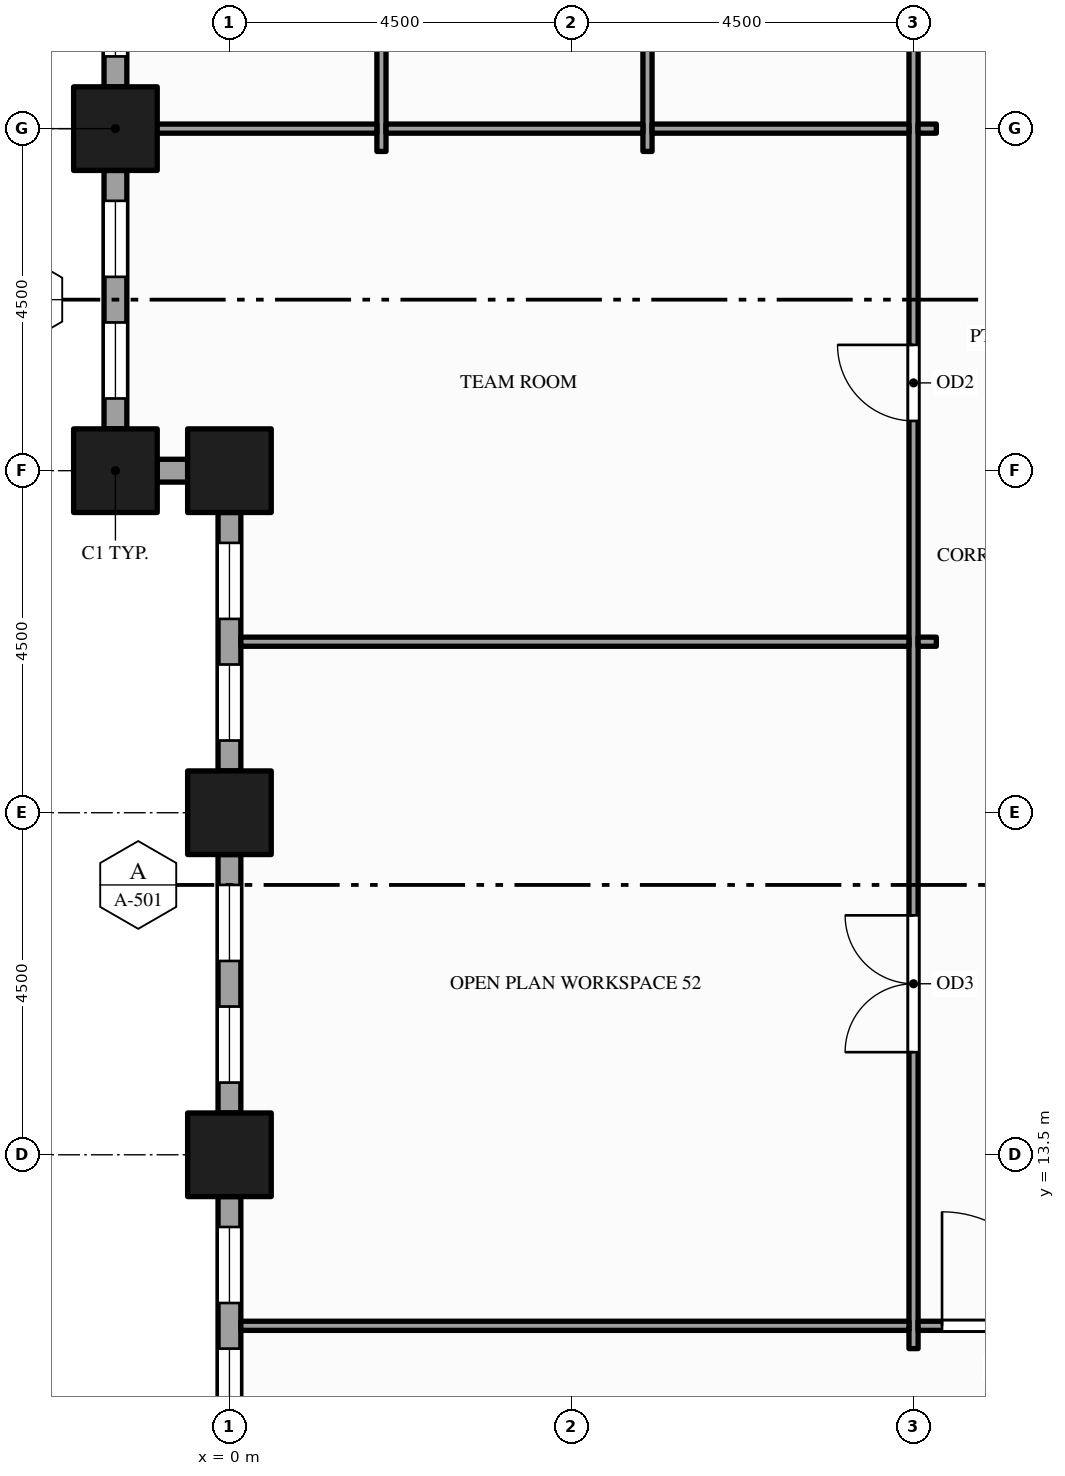
"""IFC4 building model, lengths in metres.
Left out: names, types, materials, properties, quantities, classifications, styles, units other than length and angle.
Written with IfcOpenShell. Run it as: python <this file> out.ifc"""

import sys

from ifc_helpers import new_model, si_unit, direction, frame, frame_2d, origin, origin_2d, place, context, subcontext, project, spatial, rectangle, hollow_rectangle, extrude, element, fill, save


model = new_model("IFC4")
c1 = context("Model", 3, precision=1e-05, world=origin(), true_north=direction((0.0, 1.0)))
c2 = subcontext(c1, "Body", "Model", "MODEL_VIEW")
j1 = project(units=[si_unit("LENGTHUNIT", "METRE"), si_unit("PLANEANGLEUNIT", "RADIAN")], contexts=[c1])
p1 = place(None, origin())
s1 = spatial("IfcSite", under=j1, at=p1, CompositionType="ELEMENT")
p2 = place(p1, origin())
s2 = spatial("IfcBuilding", under=s1, at=p2, CompositionType="ELEMENT")
p3 = place(p2, frame((0.0, 0.0, 73.0)))
s3 = spatial("IfcBuildingStorey", under=s2, at=p3, CompositionType="ELEMENT", Elevation=73.0)
for number, where, z_axis, x_axis in (
    (1, (-1.5, 22.5, -0.15), (0.0, 0.0, 1.0), (1.0, 0.0, 0.0)),
    (2, (-1.5, 27.0, -0.15), (0.0, 0.0, 1.0), (1.0, 0.0, 0.0)),
    (3, (0.0, 13.5, -0.15), (0.0, 0.0, 1.0), (1.0, 0.0, 0.0)),
    (4, (0.0, 18.0, -0.15), (0.0, 0.0, 1.0), (1.0, 0.0, 0.0)),
    (5, (0.0, 22.5, -0.15), (0.0, 0.0, 1.0), (1.0, 0.0, 0.0)),
):
    element("IfcColumn", number, at=place(p3, frame(where, z_axis=z_axis, x_axis=x_axis)), inside=s3, PredefinedType="COLUMN", context=c2, shape_type="SweptSolid", body=[
        extrude(hollow_rectangle(XDim=1.1, YDim=1.1, WallThickness=0.06, at=origin_2d()), origin(), (0.0, 0.0, 1.0), 3.9),
    ])
p4 = place(p3, frame((-1.5, 30.95, 0.0), z_axis=(0.0, 0.0, 1.0), x_axis=(0.0, -1.0, 0.0)))
e6 = element("IfcWall", 6, at=p4, inside=s3, PredefinedType="STANDARD", context=c2, shape_type="SweptSolid", body=[
    extrude(rectangle(XDim=3.4, YDim=0.3, at=frame_2d((1.7, 0.0))), origin(), (0.0, 0.0, 1.0), 3.044),
])
p5 = place(p4, frame((0.4, 0.0, 0.9)))
e7 = element("IfcOpeningElement", 7, at=p5, cuts=e6, PredefinedType="OPENING", context=c2, shape_type="SweptSolid", body=[
    extrude(rectangle(XDim=1.0, YDim=2.0, at=frame_2d((0.5, 1.0))), frame((0.0, 0.16, 0.0), z_axis=(0.0, -1.0, 0.0), x_axis=(1.0, 0.0, 0.0)), (0.0, 0.0, 1.0), 0.32),
])
p6 = place(p4, frame((2.0, 0.0, 0.9)))
e8 = element("IfcOpeningElement", 8, at=p6, cuts=e6, PredefinedType="OPENING", context=c2, shape_type="SweptSolid", body=[
    extrude(rectangle(XDim=1.0, YDim=2.0, at=frame_2d((0.5, 1.0))), frame((0.0, 0.16, 0.0), z_axis=(0.0, -1.0, 0.0), x_axis=(1.0, 0.0, 0.0)), (0.0, 0.0, 1.0), 0.32),
])
p7 = place(p3, frame((-1.5, 26.45, 0.0), z_axis=(0.0, 0.0, 1.0), x_axis=(0.0, -1.0, 0.0)))
e9 = element("IfcWall", 9, at=p7, inside=s3, PredefinedType="STANDARD", context=c2, shape_type="SweptSolid", body=[
    extrude(rectangle(XDim=3.4, YDim=0.3, at=frame_2d((1.7, 0.0))), origin(), (0.0, 0.0, 1.0), 3.044),
])
p8 = place(p7, frame((0.4, 0.0, 0.9)))
e10 = element("IfcOpeningElement", 10, at=p8, cuts=e9, PredefinedType="OPENING", context=c2, shape_type="SweptSolid", body=[
    extrude(rectangle(XDim=1.0, YDim=2.0, at=frame_2d((0.5, 1.0))), frame((0.0, 0.16, 0.0), z_axis=(0.0, -1.0, 0.0), x_axis=(1.0, 0.0, 0.0)), (0.0, 0.0, 1.0), 0.32),
])
p9 = place(p7, frame((2.0, 0.0, 0.9)))
e11 = element("IfcOpeningElement", 11, at=p9, cuts=e9, PredefinedType="OPENING", context=c2, shape_type="SweptSolid", body=[
    extrude(rectangle(XDim=1.0, YDim=2.0, at=frame_2d((0.5, 1.0))), frame((0.0, 0.16, 0.0), z_axis=(0.0, -1.0, 0.0), x_axis=(1.0, 0.0, 0.0)), (0.0, 0.0, 1.0), 0.32),
])
p10 = place(p3, frame((-0.95, 22.5, 0.0), z_axis=(0.0, 0.0, 1.0), x_axis=(1.0, 0.0, 0.0)))
e12 = element("IfcWall", 12, at=p10, inside=s3, PredefinedType="STANDARD", context=c2, shape_type="SweptSolid", body=[
    extrude(rectangle(XDim=0.4, YDim=0.3, at=frame_2d((0.2, 0.0))), origin(), (0.0, 0.0, 1.0), 3.044),
])
p11 = place(p3, frame((0.0, 21.95, 0.0), z_axis=(0.0, 0.0, 1.0), x_axis=(0.0, -1.0, 0.0)))
e13 = element("IfcWall", 13, at=p11, inside=s3, PredefinedType="STANDARD", context=c2, shape_type="SweptSolid", body=[
    extrude(rectangle(XDim=3.4, YDim=0.3, at=frame_2d((1.7, 0.0))), origin(), (0.0, 0.0, 1.0), 3.044),
])
p12 = place(p11, frame((0.4, 0.0, 0.9)))
e14 = element("IfcOpeningElement", 14, at=p12, cuts=e13, PredefinedType="OPENING", context=c2, shape_type="SweptSolid", body=[
    extrude(rectangle(XDim=1.0, YDim=2.0, at=frame_2d((0.5, 1.0))), frame((0.0, 0.16, 0.0), z_axis=(0.0, -1.0, 0.0), x_axis=(1.0, 0.0, 0.0)), (0.0, 0.0, 1.0), 0.32),
])
p13 = place(p11, frame((2.0, 0.0, 0.9)))
e15 = element("IfcOpeningElement", 15, at=p13, cuts=e13, PredefinedType="OPENING", context=c2, shape_type="SweptSolid", body=[
    extrude(rectangle(XDim=1.0, YDim=2.0, at=frame_2d((0.5, 1.0))), frame((0.0, 0.16, 0.0), z_axis=(0.0, -1.0, 0.0), x_axis=(1.0, 0.0, 0.0)), (0.0, 0.0, 1.0), 0.32),
])
p14 = place(p3, frame((0.0, 17.45, 0.0), z_axis=(0.0, 0.0, 1.0), x_axis=(0.0, -1.0, 0.0)))
e16 = element("IfcWall", 16, at=p14, inside=s3, PredefinedType="STANDARD", context=c2, shape_type="SweptSolid", body=[
    extrude(rectangle(XDim=3.4, YDim=0.3, at=frame_2d((1.7, 0.0))), origin(), (0.0, 0.0, 1.0), 3.044),
])
p15 = place(p14, frame((0.4, 0.0, 0.9)))
e17 = element("IfcOpeningElement", 17, at=p15, cuts=e16, PredefinedType="OPENING", context=c2, shape_type="SweptSolid", body=[
    extrude(rectangle(XDim=1.0, YDim=2.0, at=frame_2d((0.5, 1.0))), frame((0.0, 0.16, 0.0), z_axis=(0.0, -1.0, 0.0), x_axis=(1.0, 0.0, 0.0)), (0.0, 0.0, 1.0), 0.32),
])
p16 = place(p14, frame((2.0, 0.0, 0.9)))
e18 = element("IfcOpeningElement", 18, at=p16, cuts=e16, PredefinedType="OPENING", context=c2, shape_type="SweptSolid", body=[
    extrude(rectangle(XDim=1.0, YDim=2.0, at=frame_2d((0.5, 1.0))), frame((0.0, 0.16, 0.0), z_axis=(0.0, -1.0, 0.0), x_axis=(1.0, 0.0, 0.0)), (0.0, 0.0, 1.0), 0.32),
])
p17 = place(p3, frame((0.0, 12.95, 0.0), z_axis=(0.0, 0.0, 1.0), x_axis=(0.0, -1.0, 0.0)))
e19 = element("IfcWall", 19, at=p17, inside=s3, PredefinedType="STANDARD", context=c2, shape_type="SweptSolid", body=[
    extrude(rectangle(XDim=3.4, YDim=0.3, at=frame_2d((1.7, 0.0))), origin(), (0.0, 0.0, 1.0), 3.044),
])
p18 = place(p17, frame((0.4, 0.0, 0.9)))
e20 = element("IfcOpeningElement", 20, at=p18, cuts=e19, PredefinedType="OPENING", context=c2, shape_type="SweptSolid", body=[
    extrude(rectangle(XDim=1.0, YDim=2.0, at=frame_2d((0.5, 1.0))), frame((0.0, 0.16, 0.0), z_axis=(0.0, -1.0, 0.0), x_axis=(1.0, 0.0, 0.0)), (0.0, 0.0, 1.0), 0.32),
])
p19 = place(p17, frame((2.0, 0.0, 0.9)))
e21 = element("IfcOpeningElement", 21, at=p19, cuts=e19, PredefinedType="OPENING", context=c2, shape_type="SweptSolid", body=[
    extrude(rectangle(XDim=1.0, YDim=2.0, at=frame_2d((0.5, 1.0))), frame((0.0, 0.16, 0.0), z_axis=(0.0, -1.0, 0.0), x_axis=(1.0, 0.0, 0.0)), (0.0, 0.0, 1.0), 0.32),
])
for number, where, z_axis, x_axis in (
    (22, (2.0, 26.7, 0.0), (0.0, 0.0, 1.0), (0.0, 1.0, 0.0)),
    (23, (5.5, 26.7, 0.0), (0.0, 0.0, 1.0), (0.0, 1.0, 0.0)),
):
    element("IfcWall", number, at=place(p3, frame(where, z_axis=z_axis, x_axis=x_axis)), inside=s3, PredefinedType="PARTITIONING", context=c2, shape_type="SweptSolid", body=[
        extrude(rectangle(XDim=5.1, YDim=0.12, at=frame_2d((2.55, 0.0))), origin(), (0.0, 0.0, 1.0), 3.75),
    ])
p20 = place(p3, frame((9.0, 10.95, 0.0), z_axis=(0.0, 0.0, 1.0), x_axis=(0.0, 1.0, 0.0)))
e24 = element("IfcWall", 24, at=p20, inside=s3, PredefinedType="PARTITIONING", context=c2, shape_type="SweptSolid", body=[
    extrude(rectangle(XDim=20.85, YDim=0.12, at=frame_2d((10.425, 0.0))), origin(), (0.0, 0.0, 1.0), 2.5),
])
p21 = place(p20, frame((3.9, 0.0, 0.0)))
e25 = element("IfcOpeningElement", 25, at=p21, cuts=e24, PredefinedType="OPENING", context=c2, shape_type="SweptSolid", body=[
    extrude(rectangle(XDim=1.8, YDim=2.1, at=frame_2d((0.9, 1.05))), frame((0.0, 0.07, 0.0), z_axis=(0.0, -1.0, 0.0), x_axis=(1.0, 0.0, 0.0)), (0.0, 0.0, 1.0), 0.14),
])
p22 = place(p20, frame((12.205, 0.0, 0.0)))
e26 = element("IfcOpeningElement", 26, at=p22, cuts=e24, PredefinedType="OPENING", context=c2, shape_type="SweptSolid", body=[
    extrude(rectangle(XDim=1.0, YDim=2.1, at=frame_2d((0.5, 1.05))), frame((0.0, 0.07, 0.0), z_axis=(0.0, -1.0, 0.0), x_axis=(1.0, 0.0, 0.0)), (0.0, 0.0, 1.0), 0.14),
])
p23 = place(p3, frame((0.15, 11.25, 0.0), z_axis=(0.0, 0.0, 1.0), x_axis=(1.0, 0.0, 0.0)))
e27 = element("IfcWall", 27, at=p23, inside=s3, PredefinedType="PARTITIONING", context=c2, shape_type="SweptSolid", body=[
    extrude(rectangle(XDim=8.79, YDim=0.12, at=frame_2d((4.395, 0.0))), origin(), (0.0, 0.0, 1.0), 2.838),
])
p24 = place(p3, frame((9.06, 11.25, 0.0), z_axis=(0.0, 0.0, 1.0), x_axis=(1.0, 0.0, 0.0)))
e28 = element("IfcWall", 28, at=p24, inside=s3, PredefinedType="PARTITIONING", context=c2, shape_type="SweptSolid", body=[
    extrude(rectangle(XDim=2.13, YDim=0.12, at=frame_2d((1.065, 0.0))), origin(), (0.0, 0.0, 1.0), 2.838),
])
p25 = place(p24, frame((0.315, 0.0, 0.0)))
e29 = element("IfcOpeningElement", 29, at=p25, cuts=e28, PredefinedType="OPENING", context=c2, shape_type="SweptSolid", body=[
    extrude(rectangle(XDim=1.5, YDim=2.1, at=frame_2d((0.75, 1.05))), frame((0.0, 0.07, 0.0), z_axis=(0.0, -1.0, 0.0), x_axis=(1.0, 0.0, 0.0)), (0.0, 0.0, 1.0), 0.14),
])
p26 = place(p3, frame((0.15, 20.25, 0.0), z_axis=(0.0, 0.0, 1.0), x_axis=(1.0, 0.0, 0.0)))
e30 = element("IfcWall", 30, at=p26, inside=s3, PredefinedType="PARTITIONING", context=c2, shape_type="SweptSolid", body=[
    extrude(rectangle(XDim=8.79, YDim=0.12, at=frame_2d((4.395, 0.0))), origin(), (0.0, 0.0, 1.0), 2.838),
])
p27 = place(p3, frame((9.06, 20.25, 0.0), z_axis=(0.0, 0.0, 1.0), x_axis=(1.0, 0.0, 0.0)))
e31 = element("IfcWall", 31, at=p27, inside=s3, PredefinedType="PARTITIONING", context=c2, shape_type="SweptSolid", body=[
    extrude(rectangle(XDim=0.24, YDim=0.12, at=frame_2d((0.12, 0.0))), origin(), (0.0, 0.0, 1.0), 2.838),
])
p28 = place(p3, frame((-1.35, 27.0, 0.0), z_axis=(0.0, 0.0, 1.0), x_axis=(1.0, 0.0, 0.0)))
e32 = element("IfcWall", 32, at=p28, inside=s3, PredefinedType="PARTITIONING", context=c2, shape_type="SweptSolid", body=[
    extrude(rectangle(XDim=3.29, YDim=0.12, at=frame_2d((1.645, 0.0))), origin(), (0.0, 0.0, 1.0), 2.35),
])
for number, where, z_axis, x_axis in (
    (33, (2.06, 27.0, 0.0), (0.0, 0.0, 1.0), (1.0, 0.0, 0.0)),
    (34, (5.56, 27.0, 0.0), (0.0, 0.0, 1.0), (1.0, 0.0, 0.0)),
):
    element("IfcWall", number, at=place(p3, frame(where, z_axis=z_axis, x_axis=x_axis)), inside=s3, PredefinedType="PARTITIONING", context=c2, shape_type="SweptSolid", body=[
        extrude(rectangle(XDim=3.38, YDim=0.12, at=frame_2d((1.69, 0.0))), origin(), (0.0, 0.0, 1.0), 2.838),
    ])
p29 = place(p3, frame((9.06, 27.0, 0.0), z_axis=(0.0, 0.0, 1.0), x_axis=(1.0, 0.0, 0.0)))
e35 = element("IfcWall", 35, at=p29, inside=s3, PredefinedType="PARTITIONING", context=c2, shape_type="SweptSolid", body=[
    extrude(rectangle(XDim=0.24, YDim=0.12, at=frame_2d((0.12, 0.0))), origin(), (0.0, 0.0, 1.0), 2.838),
])
p30 = place(p6, origin())
e36 = element("IfcWindow", 36, at=p30, inside=s3, PartitioningType="SINGLE_PANEL", PredefinedType="WINDOW", context=c2, shape_type="SweptSolid", body=[
    extrude(rectangle(XDim=1.0, YDim=2.0, at=frame_2d((0.5, 1.0))), frame((0.0, 0.03, 0.0), z_axis=(0.0, -1.0, 0.0), x_axis=(1.0, 0.0, 0.0)), (0.0, 0.0, 1.0), 0.06),
])
fill(e8, e36)
p31 = place(p8, origin())
e37 = element("IfcWindow", 37, at=p31, inside=s3, PartitioningType="SINGLE_PANEL", PredefinedType="WINDOW", context=c2, shape_type="SweptSolid", body=[
    extrude(rectangle(XDim=1.0, YDim=2.0, at=frame_2d((0.5, 1.0))), frame((0.0, 0.03, 0.0), z_axis=(0.0, -1.0, 0.0), x_axis=(1.0, 0.0, 0.0)), (0.0, 0.0, 1.0), 0.06),
])
fill(e10, e37)
p32 = place(p9, origin())
e38 = element("IfcWindow", 38, at=p32, inside=s3, PartitioningType="SINGLE_PANEL", PredefinedType="WINDOW", context=c2, shape_type="SweptSolid", body=[
    extrude(rectangle(XDim=1.0, YDim=2.0, at=frame_2d((0.5, 1.0))), frame((0.0, 0.03, 0.0), z_axis=(0.0, -1.0, 0.0), x_axis=(1.0, 0.0, 0.0)), (0.0, 0.0, 1.0), 0.06),
])
fill(e11, e38)
p33 = place(p12, origin())
e39 = element("IfcWindow", 39, at=p33, inside=s3, PartitioningType="SINGLE_PANEL", PredefinedType="WINDOW", context=c2, shape_type="SweptSolid", body=[
    extrude(rectangle(XDim=1.0, YDim=2.0, at=frame_2d((0.5, 1.0))), frame((0.0, 0.03, 0.0), z_axis=(0.0, -1.0, 0.0), x_axis=(1.0, 0.0, 0.0)), (0.0, 0.0, 1.0), 0.06),
])
fill(e14, e39)
p34 = place(p13, origin())
e40 = element("IfcWindow", 40, at=p34, inside=s3, PartitioningType="SINGLE_PANEL", PredefinedType="WINDOW", context=c2, shape_type="SweptSolid", body=[
    extrude(rectangle(XDim=1.0, YDim=2.0, at=frame_2d((0.5, 1.0))), frame((0.0, 0.03, 0.0), z_axis=(0.0, -1.0, 0.0), x_axis=(1.0, 0.0, 0.0)), (0.0, 0.0, 1.0), 0.06),
])
fill(e15, e40)
p35 = place(p15, origin())
e41 = element("IfcWindow", 41, at=p35, inside=s3, PartitioningType="SINGLE_PANEL", PredefinedType="WINDOW", context=c2, shape_type="SweptSolid", body=[
    extrude(rectangle(XDim=1.0, YDim=2.0, at=frame_2d((0.5, 1.0))), frame((0.0, 0.03, 0.0), z_axis=(0.0, -1.0, 0.0), x_axis=(1.0, 0.0, 0.0)), (0.0, 0.0, 1.0), 0.06),
])
fill(e17, e41)
p36 = place(p16, origin())
e42 = element("IfcWindow", 42, at=p36, inside=s3, PartitioningType="SINGLE_PANEL", PredefinedType="WINDOW", context=c2, shape_type="SweptSolid", body=[
    extrude(rectangle(XDim=1.0, YDim=2.0, at=frame_2d((0.5, 1.0))), frame((0.0, 0.03, 0.0), z_axis=(0.0, -1.0, 0.0), x_axis=(1.0, 0.0, 0.0)), (0.0, 0.0, 1.0), 0.06),
])
fill(e18, e42)
p37 = place(p18, origin())
e43 = element("IfcWindow", 43, at=p37, inside=s3, PartitioningType="SINGLE_PANEL", PredefinedType="WINDOW", context=c2, shape_type="SweptSolid", body=[
    extrude(rectangle(XDim=1.0, YDim=2.0, at=frame_2d((0.5, 1.0))), frame((0.0, 0.03, 0.0), z_axis=(0.0, -1.0, 0.0), x_axis=(1.0, 0.0, 0.0)), (0.0, 0.0, 1.0), 0.06),
])
fill(e20, e43)
p38 = place(p19, origin())
e44 = element("IfcWindow", 44, at=p38, inside=s3, PartitioningType="SINGLE_PANEL", PredefinedType="WINDOW", context=c2, shape_type="SweptSolid", body=[
    extrude(rectangle(XDim=1.0, YDim=2.0, at=frame_2d((0.5, 1.0))), frame((0.0, 0.03, 0.0), z_axis=(0.0, -1.0, 0.0), x_axis=(1.0, 0.0, 0.0)), (0.0, 0.0, 1.0), 0.06),
])
fill(e21, e44)
p39 = place(p25, origin())
e45 = element("IfcDoor", 45, at=p39, inside=s3, OperationType="SINGLE_SWING_LEFT", PredefinedType="DOOR", context=c2, shape_type="SweptSolid", body=[
    extrude(rectangle(XDim=1.5, YDim=2.1, at=frame_2d((0.75, 1.05))), frame((0.0, 0.025, 0.0), z_axis=(0.0, -1.0, 0.0), x_axis=(1.0, 0.0, 0.0)), (0.0, 0.0, 1.0), 0.05),
])
fill(e29, e45)
p40 = place(p21, origin())
e46 = element("IfcDoor", 46, at=p40, inside=s3, OperationType="DOUBLE_DOOR_SINGLE_SWING", PredefinedType="DOOR", context=c2, shape_type="SweptSolid", body=[
    extrude(rectangle(XDim=1.8, YDim=2.1, at=frame_2d((0.9, 1.05))), frame((0.0, 0.025, 0.0), z_axis=(0.0, -1.0, 0.0), x_axis=(1.0, 0.0, 0.0)), (0.0, 0.0, 1.0), 0.05),
])
fill(e25, e46)
p41 = place(p22, origin())
e47 = element("IfcDoor", 47, at=p41, inside=s3, OperationType="SINGLE_SWING_RIGHT", PredefinedType="DOOR", context=c2, shape_type="SweptSolid", body=[
    extrude(rectangle(XDim=1.0, YDim=2.1, at=frame_2d((0.5, 1.05))), frame((0.0, 0.025, 0.0), z_axis=(0.0, -1.0, 0.0), x_axis=(1.0, 0.0, 0.0)), (0.0, 0.0, 1.0), 0.05),
])
fill(e26, e47)
save(model, sys.argv[1])
